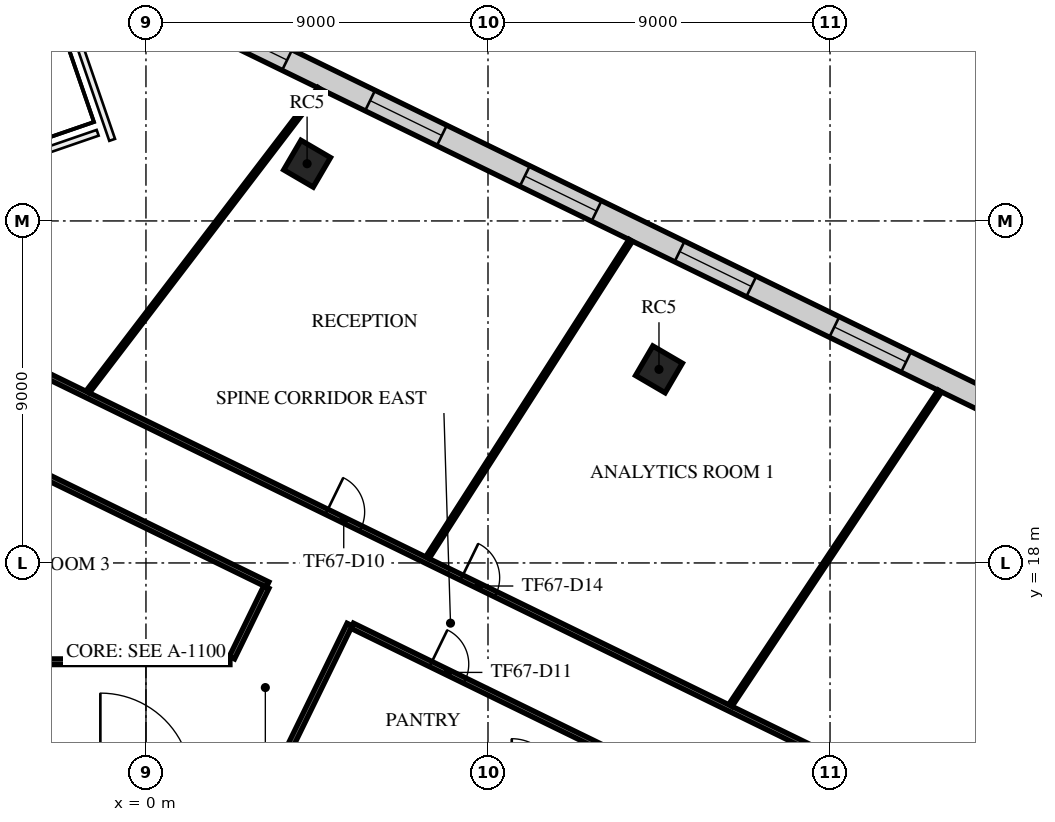
"""IFC4 building model, lengths in metres.
Left out: names, types, materials, properties, quantities, classifications, styles, units other than length and angle.
Written with IfcOpenShell. Run it as: python <this file> out.ifc"""

import sys

from ifc_helpers import new_model, si_unit, direction, frame, frame_2d, origin, origin_2d, place, context, subcontext, project, spatial, rectangle, extrude, element, fill, save


model = new_model("IFC4")
c1 = context("Model", 3, precision=1e-05, world=origin(), true_north=direction((0.0, 1.0)))
c2 = subcontext(c1, "Body", "Model", "MODEL_VIEW")
j1 = project(units=[si_unit("LENGTHUNIT", "METRE"), si_unit("PLANEANGLEUNIT", "RADIAN")], contexts=[c1])
p1 = place(None, origin())
s1 = spatial("IfcSite", under=j1, at=p1, CompositionType="ELEMENT")
p2 = place(p1, origin())
s2 = spatial("IfcBuilding", under=s1, at=p2, CompositionType="ELEMENT")
p3 = place(p2, frame((0.0, 0.0, 282.9)))
s3 = spatial("IfcBuildingStorey", under=s2, at=p3, CompositionType="ELEMENT", Elevation=282.9)
for number, where, z_axis, x_axis in (
    (1, (13.499, 23.094, 0.0), (0.0, 0.0, 1.0), (0.505, 0.863, 0.0)),
    (2, (4.24, 28.506, 0.0), (0.0, 0.0, 1.0), (0.505, 0.863, 0.0)),
):
    element("IfcColumn", number, at=place(p3, frame(where, z_axis=z_axis, x_axis=x_axis)), inside=s3, PredefinedType="COLUMN", context=c2, shape_type="SweptSolid", body=[
        extrude(rectangle(XDim=0.9, YDim=0.9, at=origin_2d()), origin(), (0.0, 0.0, 1.0), 4.0),
    ])
p4 = place(p3, frame((29.237, 18.785, 0.0), z_axis=(0.0, 0.0, 1.0), x_axis=(-0.898794534192, 0.438370146458, 0.0)))
e3 = element("IfcWall", 3, at=p4, inside=s3, PredefinedType="STANDARD", context=c2, shape_type="SweptSolid", body=[
    extrude(rectangle(XDim=36.243, YDim=0.6, at=frame_2d((18.122, 0.0))), origin(), (0.0, 0.0, 1.0), 3.64),
])
p5 = place(p4, frame((1.215, 0.0, 0.9)))
e4 = element("IfcOpeningElement", 4, at=p5, cuts=e3, PredefinedType="OPENING", context=c2, shape_type="SweptSolid", body=[
    extrude(rectangle(XDim=2.1, YDim=2.1, at=frame_2d((1.05, 1.05))), frame((0.0, 0.31, 0.0), z_axis=(0.0, -1.0, 0.0), x_axis=(1.0, 0.0, 0.0)), (0.0, 0.0, 1.0), 0.62),
])
p6 = place(p4, frame((5.746, 0.0, 0.9)))
e5 = element("IfcOpeningElement", 5, at=p6, cuts=e3, PredefinedType="OPENING", context=c2, shape_type="SweptSolid", body=[
    extrude(rectangle(XDim=2.1, YDim=2.1, at=frame_2d((1.05, 1.05))), frame((0.0, 0.31, 0.0), z_axis=(0.0, -1.0, 0.0), x_axis=(1.0, 0.0, 0.0)), (0.0, 0.0, 1.0), 0.62),
])
p7 = place(p4, frame((10.276, 0.0, 0.9)))
e6 = element("IfcOpeningElement", 6, at=p7, cuts=e3, PredefinedType="OPENING", context=c2, shape_type="SweptSolid", body=[
    extrude(rectangle(XDim=2.1, YDim=2.1, at=frame_2d((1.05, 1.05))), frame((0.0, 0.31, 0.0), z_axis=(0.0, -1.0, 0.0), x_axis=(1.0, 0.0, 0.0)), (0.0, 0.0, 1.0), 0.62),
])
p8 = place(p4, frame((14.806, 0.0, 0.9)))
e7 = element("IfcOpeningElement", 7, at=p8, cuts=e3, PredefinedType="OPENING", context=c2, shape_type="SweptSolid", body=[
    extrude(rectangle(XDim=2.1, YDim=2.1, at=frame_2d((1.05, 1.05))), frame((0.0, 0.31, 0.0), z_axis=(0.0, -1.0, 0.0), x_axis=(1.0, 0.0, 0.0)), (0.0, 0.0, 1.0), 0.62),
])
p9 = place(p4, frame((19.337, 0.0, 0.9)))
e8 = element("IfcOpeningElement", 8, at=p9, cuts=e3, PredefinedType="OPENING", context=c2, shape_type="SweptSolid", body=[
    extrude(rectangle(XDim=2.1, YDim=2.1, at=frame_2d((1.05, 1.05))), frame((0.0, 0.31, 0.0), z_axis=(0.0, -1.0, 0.0), x_axis=(1.0, 0.0, 0.0)), (0.0, 0.0, 1.0), 0.62),
])
p10 = place(p4, frame((23.867, 0.0, 0.9)))
e9 = element("IfcOpeningElement", 9, at=p10, cuts=e3, PredefinedType="OPENING", context=c2, shape_type="SweptSolid", body=[
    extrude(rectangle(XDim=2.1, YDim=2.1, at=frame_2d((1.05, 1.05))), frame((0.0, 0.31, 0.0), z_axis=(0.0, -1.0, 0.0), x_axis=(1.0, 0.0, 0.0)), (0.0, 0.0, 1.0), 0.62),
])
p11 = place(p4, frame((28.398, 0.0, 0.9)))
e10 = element("IfcOpeningElement", 10, at=p11, cuts=e3, PredefinedType="OPENING", context=c2, shape_type="SweptSolid", body=[
    extrude(rectangle(XDim=2.1, YDim=2.1, at=frame_2d((1.05, 1.05))), frame((0.0, 0.31, 0.0), z_axis=(0.0, -1.0, 0.0), x_axis=(1.0, 0.0, 0.0)), (0.0, 0.0, 1.0), 0.62),
])
p12 = place(p4, frame((32.928, 0.0, 0.9)))
e11 = element("IfcOpeningElement", 11, at=p12, cuts=e3, PredefinedType="OPENING", context=c2, shape_type="SweptSolid", body=[
    extrude(rectangle(XDim=2.1, YDim=2.1, at=frame_2d((1.05, 1.05))), frame((0.0, 0.31, 0.0), z_axis=(0.0, -1.0, 0.0), x_axis=(1.0, 0.0, 0.0)), (0.0, 0.0, 1.0), 0.62),
])
p13 = place(p3, frame((-15.325, 15.4, 0.0), z_axis=(0.0, 0.0, 1.0), x_axis=(1.0, 0.0, 0.0)))
e12 = element("IfcWall", 12, at=p13, inside=s3, PredefinedType="PARTITIONING", context=c2, shape_type="SweptSolid", body=[
    extrude(rectangle(XDim=17.535, YDim=0.15, at=frame_2d((8.768, 0.0))), origin(), (0.0, 0.0, 1.0), 3.24),
])
p14 = place(p13, frame((1.05, 0.0, 0.0)))
e13 = element("IfcOpeningElement", 13, at=p14, cuts=e12, PredefinedType="OPENING", context=c2, shape_type="SweptSolid", body=[
    extrude(rectangle(XDim=1.0, YDim=2.1, at=frame_2d((0.5, 1.05))), frame((0.0, 0.085, 0.0), z_axis=(0.0, -1.0, 0.0), x_axis=(1.0, 0.0, 0.0)), (0.0, 0.0, 1.0), 0.17),
])
p15 = place(p13, frame((10.915, 0.0, 0.0)))
e14 = element("IfcOpeningElement", 14, at=p15, cuts=e12, PredefinedType="OPENING", context=c2, shape_type="SweptSolid", body=[
    extrude(rectangle(XDim=1.0, YDim=2.1, at=frame_2d((0.5, 1.05))), frame((0.0, 0.085, 0.0), z_axis=(0.0, -1.0, 0.0), x_axis=(1.0, 0.0, 0.0)), (0.0, 0.0, 1.0), 0.17),
])
p16 = place(p3, frame((-10.156, 23.947, 0.0), z_axis=(0.0, 0.0, 1.0), x_axis=(0.898773813872, -0.438412626983, 0.0)))
e15 = element("IfcWall", 15, at=p16, inside=s3, PredefinedType="PARTITIONING", context=c2, shape_type="SweptSolid", body=[
    extrude(rectangle(XDim=14.861, YDim=0.15, at=frame_2d((7.43, 0.0))), origin(), (0.0, 0.0, 1.0), 3.04),
])
p17 = place(p3, frame((-9.104, 26.104, 0.0), z_axis=(0.0, 0.0, 1.0), x_axis=(0.898795233888, -0.438368711864, 0.0)))
e16 = element("IfcWall", 16, at=p17, inside=s3, PredefinedType="PARTITIONING", context=c2, shape_type="SweptSolid", body=[
    extrude(rectangle(XDim=39.325, YDim=0.15, at=frame_2d((19.663, 0.0))), origin(), (0.0, 0.0, 1.0), 3.04),
])
p18 = place(p17, frame((2.8, 0.0, 0.0)))
e17 = element("IfcOpeningElement", 17, at=p18, cuts=e16, PredefinedType="OPENING", context=c2, shape_type="SweptSolid", body=[
    extrude(rectangle(XDim=1.8, YDim=2.1, at=frame_2d((0.9, 1.05))), frame((0.0, 0.085, 0.0), z_axis=(0.0, -1.0, 0.0), x_axis=(1.0, 0.0, 0.0)), (0.0, 0.0, 1.0), 0.17),
])
p19 = place(p17, frame((15.419, 0.0, 0.0)))
e18 = element("IfcOpeningElement", 18, at=p19, cuts=e16, PredefinedType="OPENING", context=c2, shape_type="SweptSolid", body=[
    extrude(rectangle(XDim=1.0, YDim=2.1, at=frame_2d((0.5, 1.05))), frame((0.0, 0.085, 0.0), z_axis=(0.0, -1.0, 0.0), x_axis=(1.0, 0.0, 0.0)), (0.0, 0.0, 1.0), 0.17),
])
p20 = place(p17, frame((19.371, 0.0, 0.0)))
e19 = element("IfcOpeningElement", 19, at=p20, cuts=e16, PredefinedType="OPENING", context=c2, shape_type="SweptSolid", body=[
    extrude(rectangle(XDim=1.0, YDim=2.1, at=frame_2d((0.5, 1.05))), frame((0.0, 0.085, 0.0), z_axis=(0.0, -1.0, 0.0), x_axis=(1.0, 0.0, 0.0)), (0.0, 0.0, 1.0), 0.17),
])
p21 = place(p3, frame((2.263, 15.508, 0.0), z_axis=(0.0, 0.0, 1.0), x_axis=(0.438351446917, 0.898803654301, 0.0)))
e20 = element("IfcWall", 20, at=p21, inside=s3, PredefinedType="PARTITIONING", context=c2, shape_type="SweptSolid", body=[
    extrude(rectangle(XDim=2.066, YDim=0.15, at=frame_2d((1.033, 0.0))), origin(), (0.0, 0.0, 1.0), 3.64),
])
p22 = place(p3, frame((3.49, 12.55, 0.0), z_axis=(0.0, 0.0, 1.0), x_axis=(0.438553431108, 0.898705117412, 0.0)))
e21 = element("IfcWall", 21, at=p22, inside=s3, PredefinedType="PARTITIONING", context=c2, shape_type="SweptSolid", body=[
    extrude(rectangle(XDim=4.261, YDim=0.15, at=frame_2d((2.131, 0.0))), origin(), (0.0, 0.0, 1.0), 3.24),
])
p23 = place(p3, frame((5.427, 16.347, 0.0), z_axis=(0.0, 0.0, 1.0), x_axis=(0.898771260275, -0.43841786198, 0.0)))
e22 = element("IfcWall", 22, at=p23, inside=s3, PredefinedType="PARTITIONING", context=c2, shape_type="SweptSolid", body=[
    extrude(rectangle(XDim=8.336, YDim=0.15, at=frame_2d((4.168, 0.0))), origin(), (0.0, 0.0, 1.0), 3.24),
])
p24 = place(p23, frame((2.3, 0.0, 0.0)))
e23 = element("IfcOpeningElement", 23, at=p24, cuts=e22, PredefinedType="OPENING", context=c2, shape_type="SweptSolid", body=[
    extrude(rectangle(XDim=1.0, YDim=2.1, at=frame_2d((0.5, 1.05))), frame((0.0, 0.085, 0.0), z_axis=(0.0, -1.0, 0.0), x_axis=(1.0, 0.0, 0.0)), (0.0, 0.0, 1.0), 0.17),
])
p25 = place(p3, frame((-1.529, 22.504, 0.0), z_axis=(0.0, 0.0, 1.0), x_axis=(0.607088982963, 0.794633857046, 0.0)))
e24 = element("IfcWall", 24, at=p25, inside=s3, PredefinedType="PARTITIONING", context=c2, shape_type="SweptSolid", body=[
    extrude(rectangle(XDim=10.039, YDim=0.1, at=frame_2d((5.02, 0.0))), origin(), (0.0, 0.0, 1.0), 3.04),
])
p26 = place(p3, frame((7.408, 18.14, 0.0), z_axis=(0.0, 0.0, 1.0), x_axis=(0.539403798029, 0.842047233041, 0.0)))
e25 = element("IfcWall", 25, at=p26, inside=s3, PredefinedType="PARTITIONING", context=c2, shape_type="SweptSolid", body=[
    extrude(rectangle(XDim=9.913, YDim=0.1, at=frame_2d((4.956, 0.0))), origin(), (0.0, 0.0, 1.0), 3.04),
])
p27 = place(p3, frame((15.38, 14.254, 0.0), z_axis=(0.0, 0.0, 1.0), x_axis=(0.554513024901, 0.832175044816, 0.0)))
e26 = element("IfcWall", 26, at=p27, inside=s3, PredefinedType="PARTITIONING", context=c2, shape_type="SweptSolid", body=[
    extrude(rectangle(XDim=9.934, YDim=0.1, at=frame_2d((4.967, 0.0))), origin(), (0.0, 0.0, 1.0), 3.04),
])
p28 = place(p7, origin())
e27 = element("IfcWindow", 27, at=p28, inside=s3, PartitioningType="SINGLE_PANEL", PredefinedType="WINDOW", context=c2, shape_type="SweptSolid", body=[
    extrude(rectangle(XDim=2.1, YDim=2.1, at=frame_2d((1.05, 1.05))), frame((0.0, 0.03, 0.0), z_axis=(0.0, -1.0, 0.0), x_axis=(1.0, 0.0, 0.0)), (0.0, 0.0, 1.0), 0.06),
])
fill(e6, e27)
p29 = place(p8, origin())
e28 = element("IfcWindow", 28, at=p29, inside=s3, PartitioningType="SINGLE_PANEL", PredefinedType="WINDOW", context=c2, shape_type="SweptSolid", body=[
    extrude(rectangle(XDim=2.1, YDim=2.1, at=frame_2d((1.05, 1.05))), frame((0.0, 0.03, 0.0), z_axis=(0.0, -1.0, 0.0), x_axis=(1.0, 0.0, 0.0)), (0.0, 0.0, 1.0), 0.06),
])
fill(e7, e28)
p30 = place(p9, origin())
e29 = element("IfcWindow", 29, at=p30, inside=s3, PartitioningType="SINGLE_PANEL", PredefinedType="WINDOW", context=c2, shape_type="SweptSolid", body=[
    extrude(rectangle(XDim=2.1, YDim=2.1, at=frame_2d((1.05, 1.05))), frame((0.0, 0.03, 0.0), z_axis=(0.0, -1.0, 0.0), x_axis=(1.0, 0.0, 0.0)), (0.0, 0.0, 1.0), 0.06),
])
fill(e8, e29)
p31 = place(p10, origin())
e30 = element("IfcWindow", 30, at=p31, inside=s3, PartitioningType="SINGLE_PANEL", PredefinedType="WINDOW", context=c2, shape_type="SweptSolid", body=[
    extrude(rectangle(XDim=2.1, YDim=2.1, at=frame_2d((1.05, 1.05))), frame((0.0, 0.03, 0.0), z_axis=(0.0, -1.0, 0.0), x_axis=(1.0, 0.0, 0.0)), (0.0, 0.0, 1.0), 0.06),
])
fill(e9, e30)
p32 = place(p11, origin())
e31 = element("IfcWindow", 31, at=p32, inside=s3, PartitioningType="SINGLE_PANEL", PredefinedType="WINDOW", context=c2, shape_type="SweptSolid", body=[
    extrude(rectangle(XDim=2.1, YDim=2.1, at=frame_2d((1.05, 1.05))), frame((0.0, 0.03, 0.0), z_axis=(0.0, -1.0, 0.0), x_axis=(1.0, 0.0, 0.0)), (0.0, 0.0, 1.0), 0.06),
])
fill(e10, e31)
p33 = place(p19, origin())
e32 = element("IfcDoor", 32, at=p33, inside=s3, OperationType="SINGLE_SWING_LEFT", PredefinedType="DOOR", context=c2, shape_type="SweptSolid", body=[
    extrude(rectangle(XDim=1.0, YDim=2.1, at=frame_2d((0.5, 1.05))), frame((0.0, 0.025, 0.0), z_axis=(0.0, -1.0, 0.0), x_axis=(1.0, 0.0, 0.0)), (0.0, 0.0, 1.0), 0.05),
])
fill(e18, e32)
p34 = place(p24, frame((1.0, 0.0, 0.0), z_axis=(0.0, 0.0, 1.0), x_axis=(-1.0, 0.0, 0.0)))
e33 = element("IfcDoor", 33, at=p34, inside=s3, OperationType="SINGLE_SWING_RIGHT", PredefinedType="DOOR", context=c2, shape_type="SweptSolid", body=[
    extrude(rectangle(XDim=1.0, YDim=2.1, at=frame_2d((0.5, 1.05))), frame((0.0, 0.025, 0.0), z_axis=(0.0, -1.0, 0.0), x_axis=(1.0, 0.0, 0.0)), (0.0, 0.0, 1.0), 0.05),
])
fill(e23, e33)
p35 = place(p20, origin())
e34 = element("IfcDoor", 34, at=p35, inside=s3, OperationType="SINGLE_SWING_RIGHT", PredefinedType="DOOR", context=c2, shape_type="SweptSolid", body=[
    extrude(rectangle(XDim=1.0, YDim=2.1, at=frame_2d((0.5, 1.05))), frame((0.0, 0.025, 0.0), z_axis=(0.0, -1.0, 0.0), x_axis=(1.0, 0.0, 0.0)), (0.0, 0.0, 1.0), 0.05),
])
fill(e19, e34)
save(model, sys.argv[1])
